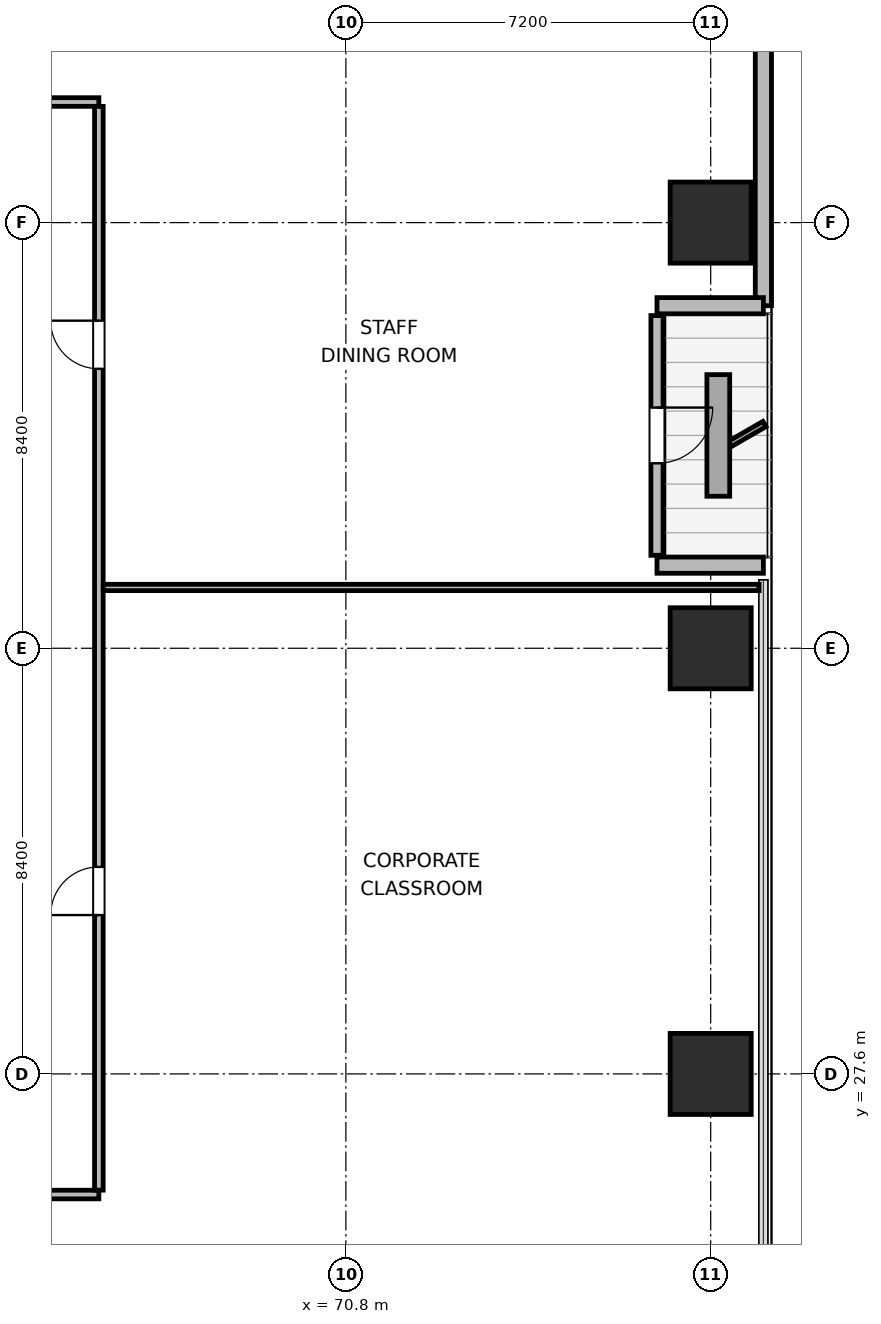
"""IFC4 building model, lengths in metres.
Left out: names, types, materials, properties, quantities, classifications, styles, units other than length and angle.
Written with IfcOpenShell. Run it as: python <this file> out.ifc"""

import sys

from ifc_helpers import new_model, si_unit, direction, frame, frame_2d, origin, origin_2d, place, context, subcontext, project, spatial, rectangle, extrude, element, fill, save


model = new_model("IFC4")
c1 = context("Model", 3, precision=1e-05, world=origin(), true_north=direction((0.0, 1.0)))
c2 = subcontext(c1, "Body", "Model", "MODEL_VIEW")
j1 = project(units=[si_unit("LENGTHUNIT", "METRE"), si_unit("PLANEANGLEUNIT", "RADIAN")], contexts=[c1])
p1 = place(None, origin())
s1 = spatial("IfcSite", under=j1, at=p1, CompositionType="ELEMENT")
p2 = place(p1, origin())
s2 = spatial("IfcBuilding", under=s1, at=p2, CompositionType="ELEMENT")
p3 = place(p2, frame((0.0, 0.0, 37.2)))
s3 = spatial("IfcBuildingStorey", under=s2, at=p3, CompositionType="ELEMENT", Elevation=37.2)
for number, where, z_axis, x_axis in (
    (1, (78.0, 27.6, 0.0), (0.0, 0.0, 1.0), (1.0, 0.0, 0.0)),
    (2, (78.0, 36.0, 0.0), (0.0, 0.0, 1.0), (1.0, 0.0, 0.0)),
    (3, (78.0, 44.4, 0.0), (0.0, 0.0, 1.0), (1.0, 0.0, 0.0)),
):
    element("IfcColumn", number, at=place(p3, frame(where, z_axis=z_axis, x_axis=x_axis)), inside=s3, PredefinedType="COLUMN", context=c2, shape_type="SweptSolid", body=[
        extrude(rectangle(XDim=1.6, YDim=1.6, at=origin_2d()), origin(), (0.0, 0.0, 1.0), 3.9),
    ])
p4 = place(p3, frame((79.04, 56.979, 0.0), z_axis=(0.0, 0.0, 1.0), x_axis=(0.0, -1.0, 0.0)))
e4 = element("IfcWall", 4, at=p4, inside=s3, PredefinedType="SOLIDWALL", context=c2, shape_type="SweptSolid", body=[
    extrude(rectangle(XDim=14.219, YDim=0.32, at=frame_2d((7.109, 0.0))), origin(), (0.0, 0.0, 1.0), 3.64),
])
p5 = place(p3, frame((79.04, 42.76, 0.0), z_axis=(0.0, 0.0, 1.0), x_axis=(-1.0, 0.0, 0.0)))
e5 = element("IfcWall", 5, at=p5, inside=s3, PredefinedType="SOLIDWALL", context=c2, shape_type="SweptSolid", body=[
    extrude(rectangle(XDim=2.1, YDim=0.32, at=frame_2d((1.05, 0.0))), origin(), (0.0, 0.0, 1.0), 2.875),
])
p6 = place(p3, frame((76.94, 42.565, 0.0), z_axis=(0.0, 0.0, 1.0), x_axis=(0.0, -1.0, 0.0)))
e6 = element("IfcWall", 6, at=p6, inside=s3, PredefinedType="SOLIDWALL", context=c2, shape_type="SweptSolid", body=[
    extrude(rectangle(XDim=4.73, YDim=0.24, at=frame_2d((2.365, 0.0))), origin(), (0.0, 0.0, 1.0), 3.162),
])
p7 = place(p6, frame((1.815, 0.0, 0.0)))
e7 = element("IfcOpeningElement", 7, at=p7, cuts=e6, PredefinedType="OPENING", context=c2, shape_type="SweptSolid", body=[
    extrude(rectangle(XDim=1.1, YDim=2.04, at=frame_2d((0.55, 1.02))), frame((0.0, 0.13, 0.0), z_axis=(0.0, -1.0, 0.0), x_axis=(1.0, 0.0, 0.0)), (0.0, 0.0, 1.0), 0.26),
])
p8 = place(p3, frame((76.94, 37.64, 0.0), z_axis=(0.0, 0.0, 1.0), x_axis=(1.0, 0.0, 0.0)))
e8 = element("IfcWall", 8, at=p8, inside=s3, PredefinedType="SOLIDWALL", context=c2, shape_type="SweptSolid", body=[
    extrude(rectangle(XDim=2.1, YDim=0.32, at=frame_2d((1.05, 0.0))), origin(), (0.0, 0.0, 1.0), 2.875),
])
p9 = place(p3, frame((30.075, 25.22, 0.0), z_axis=(0.0, 0.0, 1.0), x_axis=(1.0, 0.0, 0.0)))
e9 = element("IfcWall", 9, at=p9, inside=s3, PredefinedType="PARTITIONING", context=c2, shape_type="SweptSolid", body=[
    extrude(rectangle(XDim=35.85, YDim=0.17, at=frame_2d((17.925, 0.0))), origin(), (0.0, 0.0, 1.0), 3.64),
])
p10 = place(p9, frame((4.308, 0.0, 0.0)))
e10 = element("IfcOpeningElement", 10, at=p10, cuts=e9, PredefinedType="OPENING", context=c2, shape_type="SweptSolid", body=[
    extrude(rectangle(XDim=0.95, YDim=2.04, at=frame_2d((0.475, 1.02))), frame((0.0, 0.095, 0.0), z_axis=(0.0, -1.0, 0.0), x_axis=(1.0, 0.0, 0.0)), (0.0, 0.0, 1.0), 0.19),
])
p11 = place(p9, frame((13.27, 0.0, 0.0)))
e11 = element("IfcOpeningElement", 11, at=p11, cuts=e9, PredefinedType="OPENING", context=c2, shape_type="SweptSolid", body=[
    extrude(rectangle(XDim=0.95, YDim=2.04, at=frame_2d((0.475, 1.02))), frame((0.0, 0.095, 0.0), z_axis=(0.0, -1.0, 0.0), x_axis=(1.0, 0.0, 0.0)), (0.0, 0.0, 1.0), 0.19),
])
p12 = place(p9, frame((21.63, 0.0, 0.0)))
e12 = element("IfcOpeningElement", 12, at=p12, cuts=e9, PredefinedType="OPENING", context=c2, shape_type="SweptSolid", body=[
    extrude(rectangle(XDim=0.95, YDim=2.04, at=frame_2d((0.475, 1.02))), frame((0.0, 0.095, 0.0), z_axis=(0.0, -1.0, 0.0), x_axis=(1.0, 0.0, 0.0)), (0.0, 0.0, 1.0), 0.19),
])
p13 = place(p9, frame((30.592, 0.0, 0.0)))
e13 = element("IfcOpeningElement", 13, at=p13, cuts=e9, PredefinedType="OPENING", context=c2, shape_type="SweptSolid", body=[
    extrude(rectangle(XDim=0.95, YDim=2.04, at=frame_2d((0.475, 1.02))), frame((0.0, 0.095, 0.0), z_axis=(0.0, -1.0, 0.0), x_axis=(1.0, 0.0, 0.0)), (0.0, 0.0, 1.0), 0.19),
])
p14 = place(p3, frame((30.075, 46.78, 0.0), z_axis=(0.0, 0.0, 1.0), x_axis=(1.0, 0.0, 0.0)))
e14 = element("IfcWall", 14, at=p14, inside=s3, PredefinedType="PARTITIONING", context=c2, shape_type="SweptSolid", body=[
    extrude(rectangle(XDim=35.85, YDim=0.17, at=frame_2d((17.925, 0.0))), origin(), (0.0, 0.0, 1.0), 3.64),
])
p15 = place(p14, frame((4.053, 0.0, 0.0)))
e15 = element("IfcOpeningElement", 15, at=p15, cuts=e14, PredefinedType="OPENING", context=c2, shape_type="SweptSolid", body=[
    extrude(rectangle(XDim=0.95, YDim=2.04, at=frame_2d((0.475, 1.02))), frame((0.0, 0.095, 0.0), z_axis=(0.0, -1.0, 0.0), x_axis=(1.0, 0.0, 0.0)), (0.0, 0.0, 1.0), 0.19),
])
p16 = place(p14, frame((11.05, 0.0, 0.0)))
e16 = element("IfcOpeningElement", 16, at=p16, cuts=e14, PredefinedType="OPENING", context=c2, shape_type="SweptSolid", body=[
    extrude(rectangle(XDim=0.95, YDim=2.04, at=frame_2d((0.475, 1.02))), frame((0.0, 0.095, 0.0), z_axis=(0.0, -1.0, 0.0), x_axis=(1.0, 0.0, 0.0)), (0.0, 0.0, 1.0), 0.19),
])
p17 = place(p14, frame((16.55, 0.0, 0.0)))
e17 = element("IfcOpeningElement", 17, at=p17, cuts=e14, PredefinedType="OPENING", context=c2, shape_type="SweptSolid", body=[
    extrude(rectangle(XDim=0.95, YDim=2.04, at=frame_2d((0.475, 1.02))), frame((0.0, 0.095, 0.0), z_axis=(0.0, -1.0, 0.0), x_axis=(1.0, 0.0, 0.0)), (0.0, 0.0, 1.0), 0.19),
])
p18 = place(p14, frame((20.82, 0.0, 0.0)))
e18 = element("IfcOpeningElement", 18, at=p18, cuts=e14, PredefinedType="OPENING", context=c2, shape_type="SweptSolid", body=[
    extrude(rectangle(XDim=0.95, YDim=2.04, at=frame_2d((0.475, 1.02))), frame((0.0, 0.095, 0.0), z_axis=(0.0, -1.0, 0.0), x_axis=(1.0, 0.0, 0.0)), (0.0, 0.0, 1.0), 0.19),
])
p19 = place(p14, frame((25.985, 0.0, 0.0)))
e19 = element("IfcOpeningElement", 19, at=p19, cuts=e14, PredefinedType="OPENING", context=c2, shape_type="SweptSolid", body=[
    extrude(rectangle(XDim=0.95, YDim=2.04, at=frame_2d((0.475, 1.02))), frame((0.0, 0.095, 0.0), z_axis=(0.0, -1.0, 0.0), x_axis=(1.0, 0.0, 0.0)), (0.0, 0.0, 1.0), 0.19),
])
p20 = place(p14, frame((32.643, 0.0, 0.0)))
e20 = element("IfcOpeningElement", 20, at=p20, cuts=e14, PredefinedType="OPENING", context=c2, shape_type="SweptSolid", body=[
    extrude(rectangle(XDim=0.95, YDim=2.04, at=frame_2d((0.475, 1.02))), frame((0.0, 0.095, 0.0), z_axis=(0.0, -1.0, 0.0), x_axis=(1.0, 0.0, 0.0)), (0.0, 0.0, 1.0), 0.19),
])
p21 = place(p3, frame((65.925, 25.307, 0.0), z_axis=(0.0, 0.0, 1.0), x_axis=(0.0, 1.0, 0.0)))
e21 = element("IfcWall", 21, at=p21, inside=s3, PredefinedType="PARTITIONING", context=c2, shape_type="SweptSolid", body=[
    extrude(rectangle(XDim=21.386, YDim=0.17, at=frame_2d((10.693, 0.0))), origin(), (0.0, 0.0, 1.0), 3.64),
])
p22 = place(p21, frame((5.428, 0.0, 0.0)))
e22 = element("IfcOpeningElement", 22, at=p22, cuts=e21, PredefinedType="OPENING", context=c2, shape_type="SweptSolid", body=[
    extrude(rectangle(XDim=0.95, YDim=2.04, at=frame_2d((0.475, 1.02))), frame((0.0, 0.095, 0.0), z_axis=(0.0, -1.0, 0.0), x_axis=(1.0, 0.0, 0.0)), (0.0, 0.0, 1.0), 0.19),
])
p23 = place(p21, frame((16.208, 0.0, 0.0)))
e23 = element("IfcOpeningElement", 23, at=p23, cuts=e21, PredefinedType="OPENING", context=c2, shape_type="SweptSolid", body=[
    extrude(rectangle(XDim=0.95, YDim=2.04, at=frame_2d((0.475, 1.02))), frame((0.0, 0.095, 0.0), z_axis=(0.0, -1.0, 0.0), x_axis=(1.0, 0.0, 0.0)), (0.0, 0.0, 1.0), 0.19),
])
p24 = place(p3, frame((66.012, 37.2, 0.0), z_axis=(0.0, 0.0, 1.0), x_axis=(1.0, 0.0, 0.0)))
e24 = element("IfcWall", 24, at=p24, inside=s3, PredefinedType="PARTITIONING", context=c2, shape_type="SweptSolid", body=[
    extrude(rectangle(XDim=12.943, YDim=0.125, at=frame_2d((6.472, 0.0))), origin(), (0.0, 0.0, 1.0), 3.64),
])
p25 = place(p7, origin())
e25 = element("IfcDoor", 25, at=p25, inside=s3, OperationType="SINGLE_SWING_LEFT", PredefinedType="DOOR", context=c2, shape_type="SweptSolid", body=[
    extrude(rectangle(XDim=1.1, YDim=2.04, at=frame_2d((0.55, 1.02))), frame((0.0, 0.025, 0.0), z_axis=(0.0, -1.0, 0.0), x_axis=(1.0, 0.0, 0.0)), (0.0, 0.0, 1.0), 0.05),
])
fill(e7, e25)
p26 = place(p22, origin())
e26 = element("IfcDoor", 26, at=p26, inside=s3, OperationType="SINGLE_SWING_LEFT", PredefinedType="DOOR", context=c2, shape_type="SweptSolid", body=[
    extrude(rectangle(XDim=0.95, YDim=2.04, at=frame_2d((0.475, 1.02))), frame((0.0, 0.025, 0.0), z_axis=(0.0, -1.0, 0.0), x_axis=(1.0, 0.0, 0.0)), (0.0, 0.0, 1.0), 0.05),
])
fill(e22, e26)
p27 = place(p23, origin())
e27 = element("IfcDoor", 27, at=p27, inside=s3, OperationType="SINGLE_SWING_RIGHT", PredefinedType="DOOR", context=c2, shape_type="SweptSolid", body=[
    extrude(rectangle(XDim=0.95, YDim=2.04, at=frame_2d((0.475, 1.02))), frame((0.0, 0.025, 0.0), z_axis=(0.0, -1.0, 0.0), x_axis=(1.0, 0.0, 0.0)), (0.0, 0.0, 1.0), 0.05),
])
fill(e23, e27)
save(model, sys.argv[1])
